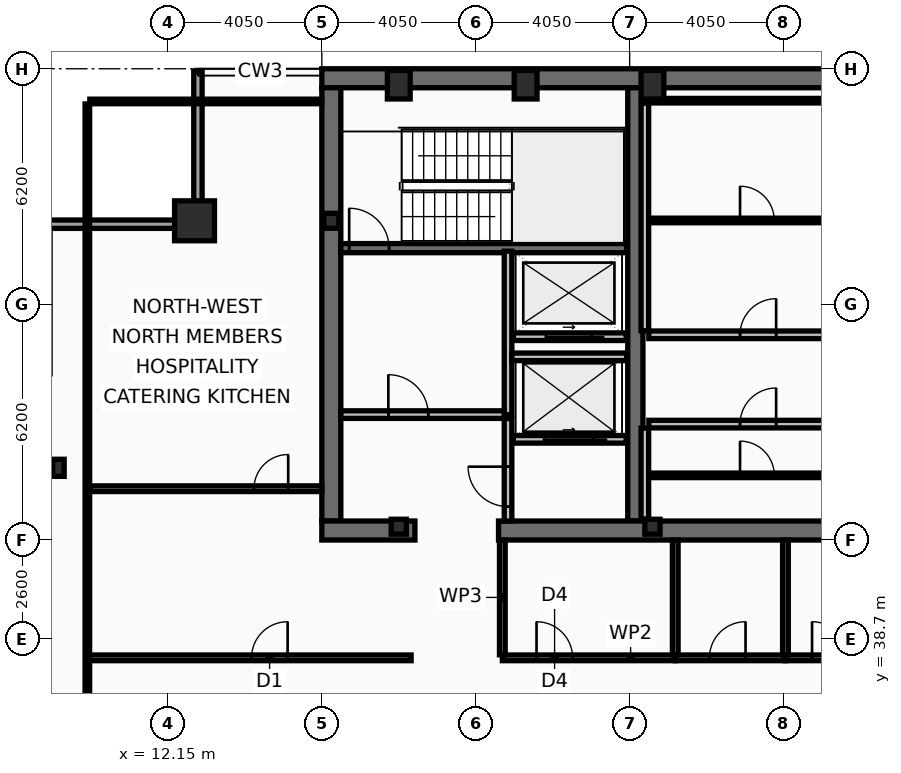
"""IFC4 building model, lengths in metres.
Left out: names, types, materials, properties, quantities, classifications, styles, units other than length and angle.
Written with IfcOpenShell. Run it as: python <this file> out.ifc"""

import sys

from ifc_helpers import new_model, si_unit, direction, frame, frame_2d, origin, origin_2d, place, context, subcontext, project, spatial, rectangle, hollow_rectangle, i_section, extrude, element, fill, save


model = new_model("IFC4")
c1 = context("Model", 3, precision=1e-05, world=origin(), true_north=direction((0.0, 1.0)))
c2 = subcontext(c1, "Body", "Model", "MODEL_VIEW")
j1 = project(units=[si_unit("LENGTHUNIT", "METRE"), si_unit("PLANEANGLEUNIT", "RADIAN")], contexts=[c1])
p1 = place(None, origin())
s1 = spatial("IfcSite", under=j1, at=p1, CompositionType="ELEMENT")
p2 = place(p1, origin())
s2 = spatial("IfcBuilding", under=s1, at=p2, CompositionType="ELEMENT")
p3 = place(p2, frame((0.0, 0.0, 280.6)))
s3 = spatial("IfcBuildingStorey", under=s2, at=p3, CompositionType="ELEMENT", Elevation=280.6)
p4 = place(p3, frame((16.2, 53.45, 0.0), z_axis=(0.0, 0.0, 1.0), x_axis=(1.0, 0.0, 0.0)))
e1 = element("IfcWall", 1, at=p4, inside=s3, PredefinedType="SHEAR", context=c2, shape_type="SweptSolid", body=[
    extrude(rectangle(XDim=40.5, YDim=0.5, at=frame_2d((20.25, 0.0))), origin(), (0.0, 0.0, 1.0), 3.44),
])
p5 = place(p3, frame((16.45, 41.8, 0.0), z_axis=(0.0, 0.0, 1.0), x_axis=(0.0, 1.0, 0.0)))
e2 = element("IfcWall", 2, at=p5, inside=s3, PredefinedType="SHEAR", context=c2, shape_type="SweptSolid", body=[
    extrude(rectangle(XDim=11.4, YDim=0.5, at=frame_2d((5.7, 0.0))), origin(), (0.0, 0.0, 1.0), 3.44),
])
p6 = place(p3, frame((24.45, 41.8, 0.0), z_axis=(0.0, 0.0, 1.0), x_axis=(0.0, 1.0, 0.0)))
e3 = element("IfcWall", 3, at=p6, inside=s3, PredefinedType="SHEAR", context=c2, shape_type="SweptSolid", body=[
    extrude(rectangle(XDim=11.4, YDim=0.4, at=frame_2d((5.7, 0.0))), origin(), (0.0, 0.0, 1.0), 3.44),
])
p7 = place(p3, frame((18.65, 41.55, 0.0), z_axis=(0.0, 0.0, 1.0), x_axis=(-1.0, 0.0, 0.0)))
e4 = element("IfcWall", 4, at=p7, inside=s3, PredefinedType="SHEAR", context=c2, shape_type="SweptSolid", body=[
    extrude(rectangle(XDim=2.45, YDim=0.5, at=frame_2d((1.225, 0.0))), origin(), (0.0, 0.0, 1.0), 3.44),
])
p8 = place(p3, frame((32.3, 41.55, 0.0), z_axis=(0.0, 0.0, 1.0), x_axis=(-1.0, 0.0, 0.0)))
e5 = element("IfcWall", 5, at=p8, inside=s3, PredefinedType="SHEAR", context=c2, shape_type="SweptSolid", body=[
    extrude(rectangle(XDim=11.45, YDim=0.5, at=frame_2d((5.725, 0.0))), origin(), (0.0, 0.0, 1.0), 3.44),
])
p9 = place(p3, frame((16.7, 48.98, 0.0), z_axis=(0.0, 0.0, 1.0), x_axis=(1.0, 0.0, 0.0)))
e6 = element("IfcWall", 6, at=p9, inside=s3, PredefinedType="SHEAR", context=c2, shape_type="SweptSolid", body=[
    extrude(rectangle(XDim=7.52, YDim=0.24, at=frame_2d((3.76, 0.0))), origin(), (0.0, 0.0, 1.0), 3.44),
])
p10 = place(p9, frame((0.22, 0.0, 0.0)))
e7 = element("IfcOpeningElement", 7, at=p10, cuts=e6, PredefinedType="OPENING", context=c2, shape_type="SweptSolid", body=[
    extrude(rectangle(XDim=1.05, YDim=2.15, at=frame_2d((0.525, 1.075))), frame((0.0, 0.13, 0.0), z_axis=(0.0, -1.0, 0.0), x_axis=(1.0, 0.0, 0.0)), (0.0, 0.0, 1.0), 0.26),
])
p11 = place(p3, frame((12.85, 49.7, 0.0), z_axis=(0.0, 0.0, 1.0), x_axis=(1.0, 0.0, 0.0)))
e8 = element("IfcColumn", 8, at=p11, inside=s3, PredefinedType="COLUMN", context=c2, shape_type="SweptSolid", body=[
    extrude(hollow_rectangle(XDim=1.05, YDim=1.05, WallThickness=0.055, at=origin_2d()), origin(), (0.0, 0.0, 1.0), 3.6),
])
for number, where, z_axis, x_axis in (
    (9, (18.225, 53.28, 0.0), (0.0, 0.0, 1.0), (1.0, 0.0, 0.0)),
    (10, (21.562, 53.28, 0.0), (0.0, 0.0, 1.0), (1.0, 0.0, 0.0)),
    (11, (24.9, 53.28, 0.0), (0.0, 0.0, 1.0), (1.0, 0.0, 0.0)),
):
    element("IfcColumn", number, at=place(p3, frame(where, z_axis=z_axis, x_axis=x_axis)), inside=s3, PredefinedType="COLUMN", context=c2, shape_type="SweptSolid", body=[
        extrude(hollow_rectangle(XDim=0.6, YDim=0.75, WallThickness=0.045, at=origin_2d()), origin(), (0.0, 0.0, 1.0), 3.6),
    ])
p12 = place(p3, frame((9.27, 43.2, 0.0), z_axis=(0.0, 0.0, 1.0), x_axis=(1.0, 0.0, 0.0)))
e12 = element("IfcColumn", 12, at=p12, inside=s3, PredefinedType="COLUMN", context=c2, shape_type="SweptSolid", body=[
    extrude(i_section(OverallWidth=0.3, OverallDepth=0.45, WebThickness=0.014, FlangeThickness=0.026, at=origin_2d()), origin(), (0.0, 0.0, 1.0), 3.6),
])
for number, where, z_axis, x_axis in (
    (13, (16.45, 49.7, 0.0), (0.0, 0.0, 1.0), (1.0, 0.0, 0.0)),
    (14, (18.225, 41.65, 0.0), (0.0, 0.0, 1.0), (1.0, 0.0, 0.0)),
    (15, (24.9, 41.65, 0.0), (0.0, 0.0, 1.0), (1.0, 0.0, 0.0)),
):
    element("IfcColumn", number, at=place(p3, frame(where, z_axis=z_axis, x_axis=x_axis)), inside=s3, PredefinedType="COLUMN", context=c2, shape_type="SweptSolid", body=[
        extrude(i_section(OverallWidth=0.399, OverallDepth=0.393, WebThickness=0.023, FlangeThickness=0.037, at=origin_2d()), origin(), (0.0, 0.0, 1.0), 3.6),
    ])
p13 = place(p3, frame((8.83, 49.61, 0.0), z_axis=(0.0, 0.0, 1.0), x_axis=(1.0, 0.0, 0.0)))
e16 = element("IfcWall", 16, at=p13, inside=s3, PredefinedType="SOLIDWALL", context=c2, shape_type="SweptSolid", body=[
    extrude(rectangle(XDim=4.22, YDim=0.22, at=frame_2d((2.11, 0.0))), origin(), (0.0, 0.0, 1.0), 2.88),
])
p14 = place(p3, frame((12.94, 49.72, 0.0), z_axis=(0.0, 0.0, 1.0), x_axis=(0.0, 1.0, 0.0)))
e17 = element("IfcWall", 17, at=p14, inside=s3, PredefinedType="SOLIDWALL", context=c2, shape_type="SweptSolid", body=[
    extrude(rectangle(XDim=3.91, YDim=0.22, at=frame_2d((1.955, 0.0))), origin(), (0.0, 0.0, 1.0), 2.88),
])
p15 = place(p3, frame((24.21, 43.95, 0.0), z_axis=(0.0, 0.0, 1.0), x_axis=(-1.0, 0.0, 0.0)))
e18 = element("IfcWall", 18, at=p15, inside=s3, PredefinedType="PARTITIONING", context=c2, shape_type="SweptSolid", body=[
    extrude(rectangle(XDim=2.97, YDim=0.2, at=frame_2d((1.485, 0.0))), origin(), (0.0, 0.0, 1.0), 3.44),
])
p16 = place(p15, frame((0.86, 0.0, 0.0)))
e19 = element("IfcOpeningElement", 19, at=p16, cuts=e18, PredefinedType="OPENING", context=c2, shape_type="SweptSolid", body=[
    extrude(rectangle(XDim=1.3, YDim=2.18, at=frame_2d((0.65, 1.09))), frame((0.0, 0.11, 0.0), z_axis=(0.0, -1.0, 0.0), x_axis=(1.0, 0.0, 0.0)), (0.0, 0.0, 1.0), 0.22),
])
p17 = place(p3, frame((24.21, 46.65, 0.0), z_axis=(0.0, 0.0, 1.0), x_axis=(-1.0, 0.0, 0.0)))
e20 = element("IfcWall", 20, at=p17, inside=s3, PredefinedType="PARTITIONING", context=c2, shape_type="SweptSolid", body=[
    extrude(rectangle(XDim=2.97, YDim=0.2, at=frame_2d((1.485, 0.0))), origin(), (0.0, 0.0, 1.0), 3.44),
])
p18 = place(p17, frame((0.91, 0.0, 0.0)))
e21 = element("IfcOpeningElement", 21, at=p18, cuts=e20, PredefinedType="OPENING", context=c2, shape_type="SweptSolid", body=[
    extrude(rectangle(XDim=1.2, YDim=2.18, at=frame_2d((0.6, 1.09))), frame((0.0, 0.11, 0.0), z_axis=(0.0, -1.0, 0.0), x_axis=(1.0, 0.0, 0.0)), (0.0, 0.0, 1.0), 0.22),
])
p19 = place(p3, frame((21.1, 44.6, 0.0), z_axis=(0.0, 0.0, 1.0), x_axis=(0.0, 1.0, 0.0)))
e22 = element("IfcWall", 22, at=p19, inside=s3, PredefinedType="PARTITIONING", context=c2, shape_type="SweptSolid", body=[
    extrude(rectangle(XDim=4.3, YDim=0.2, at=frame_2d((2.15, 0.0))), origin(), (0.0, 0.0, 1.0), 3.44),
])
p20 = place(p3, frame((16.7, 44.6, 0.0), z_axis=(0.0, 0.0, 1.0), x_axis=(1.0, 0.0, 0.0)))
e23 = element("IfcWall", 23, at=p20, inside=s3, PredefinedType="PARTITIONING", context=c2, shape_type="SweptSolid", body=[
    extrude(rectangle(XDim=4.3, YDim=0.2, at=frame_2d((2.15, 0.0))), origin(), (0.0, 0.0, 1.0), 3.44),
])
p21 = place(p20, frame((1.25, 0.0, 0.0)))
e24 = element("IfcOpeningElement", 24, at=p21, cuts=e23, PredefinedType="OPENING", context=c2, shape_type="SweptSolid", body=[
    extrude(rectangle(XDim=1.05, YDim=2.15, at=frame_2d((0.525, 1.075))), frame((0.0, 0.11, 0.0), z_axis=(0.0, -1.0, 0.0), x_axis=(1.0, 0.0, 0.0)), (0.0, 0.0, 1.0), 0.22),
])
p22 = place(p3, frame((21.2, 46.12, 0.0), z_axis=(0.0, 0.0, 1.0), x_axis=(1.0, 0.0, 0.0)))
e25 = element("IfcWall", 25, at=p22, inside=s3, PredefinedType="PARTITIONING", context=c2, shape_type="SweptSolid", body=[
    extrude(rectangle(XDim=3.02, YDim=0.2, at=frame_2d((1.51, 0.0))), origin(), (0.0, 0.0, 1.0), 3.44),
])
p23 = place(p3, frame((21.1, 41.8, 0.0), z_axis=(0.0, 0.0, 1.0), x_axis=(0.0, 1.0, 0.0)))
e26 = element("IfcWall", 26, at=p23, inside=s3, PredefinedType="PARTITIONING", context=c2, shape_type="SweptSolid", body=[
    extrude(rectangle(XDim=2.695, YDim=0.2, at=frame_2d((1.348, 0.0))), origin(), (0.0, 0.0, 1.0), 3.44),
])
p24 = place(p23, frame((0.38, 0.0, 0.0)))
e27 = element("IfcOpeningElement", 27, at=p24, cuts=e26, PredefinedType="OPENING", context=c2, shape_type="SweptSolid", body=[
    extrude(rectangle(XDim=1.05, YDim=2.15, at=frame_2d((0.525, 1.075))), frame((0.0, 0.11, 0.0), z_axis=(0.0, -1.0, 0.0), x_axis=(1.0, 0.0, 0.0)), (0.0, 0.0, 1.0), 0.22),
])
p25 = place(p3, frame((24.7, 46.805, 0.0), z_axis=(0.0, 0.0, 1.0), x_axis=(0.0, 1.0, 0.0)))
e28 = element("IfcWall", 28, at=p25, inside=s3, PredefinedType="PARTITIONING", context=c2, shape_type="SweptSolid", body=[
    extrude(rectangle(XDim=5.99, YDim=0.2, at=frame_2d((2.995, 0.0))), origin(), (0.0, 0.0, 1.0), 3.44),
])
p26 = place(p3, frame((24.805, 52.86, 0.0), z_axis=(0.0, 0.0, 1.0), x_axis=(1.0, 0.0, 0.0)))
e29 = element("IfcWall", 29, at=p26, inside=s3, PredefinedType="PARTITIONING", context=c2, shape_type="SweptSolid", body=[
    extrude(rectangle(XDim=7.51, YDim=0.12, at=frame_2d((3.755, 0.0))), origin(), (0.0, 0.0, 1.0), 3.44),
])
p27 = place(p3, frame((24.805, 49.709, 0.0), z_axis=(0.0, 0.0, 1.0), x_axis=(1.0, 0.0, 0.0)))
e30 = element("IfcWall", 30, at=p27, inside=s3, PredefinedType="PARTITIONING", context=c2, shape_type="SweptSolid", body=[
    extrude(rectangle(XDim=7.51, YDim=0.12, at=frame_2d((3.755, 0.0))), origin(), (0.0, 0.0, 1.0), 3.44),
])
p28 = place(p27, frame((2.4, 0.0, 0.0)))
e31 = element("IfcOpeningElement", 31, at=p28, cuts=e30, PredefinedType="OPENING", context=c2, shape_type="SweptSolid", body=[
    extrude(rectangle(XDim=0.9, YDim=2.05, at=frame_2d((0.45, 1.025))), frame((0.0, 0.07, 0.0), z_axis=(0.0, -1.0, 0.0), x_axis=(1.0, 0.0, 0.0)), (0.0, 0.0, 1.0), 0.14),
])
p29 = place(p3, frame((24.805, 46.7, 0.0), z_axis=(0.0, 0.0, 1.0), x_axis=(1.0, 0.0, 0.0)))
e32 = element("IfcWall", 32, at=p29, inside=s3, PredefinedType="PARTITIONING", context=c2, shape_type="SweptSolid", body=[
    extrude(rectangle(XDim=7.51, YDim=0.2, at=frame_2d((3.755, 0.0))), origin(), (0.0, 0.0, 1.0), 3.44),
])
p30 = place(p29, frame((2.4, 0.0, 0.0)))
e33 = element("IfcOpeningElement", 33, at=p30, cuts=e32, PredefinedType="OPENING", context=c2, shape_type="SweptSolid", body=[
    extrude(rectangle(XDim=0.95, YDim=2.1, at=frame_2d((0.475, 1.05))), frame((0.0, 0.11, 0.0), z_axis=(0.0, -1.0, 0.0), x_axis=(1.0, 0.0, 0.0)), (0.0, 0.0, 1.0), 0.22),
])
p31 = place(p3, frame((24.7, 41.85, 0.0), z_axis=(0.0, 0.0, 1.0), x_axis=(0.0, 1.0, 0.0)))
e34 = element("IfcWall", 34, at=p31, inside=s3, PredefinedType="PARTITIONING", context=c2, shape_type="SweptSolid", body=[
    extrude(rectangle(XDim=2.395, YDim=0.2, at=frame_2d((1.198, 0.0))), origin(), (0.0, 0.0, 1.0), 3.44),
])
p32 = place(p3, frame((24.805, 43.002, 0.0), z_axis=(0.0, 0.0, 1.0), x_axis=(1.0, 0.0, 0.0)))
e35 = element("IfcWall", 35, at=p32, inside=s3, PredefinedType="PARTITIONING", context=c2, shape_type="SweptSolid", body=[
    extrude(rectangle(XDim=7.34, YDim=0.12, at=frame_2d((3.67, 0.0))), origin(), (0.0, 0.0, 1.0), 3.44),
])
p33 = place(p32, frame((2.4, 0.0, 0.0)))
e36 = element("IfcOpeningElement", 36, at=p33, cuts=e35, PredefinedType="OPENING", context=c2, shape_type="SweptSolid", body=[
    extrude(rectangle(XDim=0.9, YDim=2.05, at=frame_2d((0.45, 1.025))), frame((0.0, 0.07, 0.0), z_axis=(0.0, -1.0, 0.0), x_axis=(1.0, 0.0, 0.0)), (0.0, 0.0, 1.0), 0.14),
])
p34 = place(p3, frame((24.805, 44.35, 0.0), z_axis=(0.0, 0.0, 1.0), x_axis=(1.0, 0.0, 0.0)))
e37 = element("IfcWall", 37, at=p34, inside=s3, PredefinedType="PARTITIONING", context=c2, shape_type="SweptSolid", body=[
    extrude(rectangle(XDim=7.34, YDim=0.2, at=frame_2d((3.67, 0.0))), origin(), (0.0, 0.0, 1.0), 3.44),
])
p35 = place(p34, frame((2.4, 0.0, 0.0)))
e38 = element("IfcOpeningElement", 38, at=p35, cuts=e37, PredefinedType="OPENING", context=c2, shape_type="SweptSolid", body=[
    extrude(rectangle(XDim=0.95, YDim=2.1, at=frame_2d((0.475, 1.05))), frame((0.0, 0.11, 0.0), z_axis=(0.0, -1.0, 0.0), x_axis=(1.0, 0.0, 0.0)), (0.0, 0.0, 1.0), 0.22),
])
p36 = place(p3, frame((20.95, 38.2, 0.0), z_axis=(0.0, 0.0, 1.0), x_axis=(1.0, 0.0, 0.0)))
e39 = element("IfcWall", 39, at=p36, inside=s3, PredefinedType="PARTITIONING", context=c2, shape_type="SweptSolid", body=[
    extrude(rectangle(XDim=4.55, YDim=0.15, at=frame_2d((2.275, 0.0))), origin(), (0.0, 0.0, 1.0), 2.78),
])
p37 = place(p36, frame((0.9, 0.0, 0.0)))
e40 = element("IfcOpeningElement", 40, at=p37, cuts=e39, PredefinedType="OPENING", context=c2, shape_type="SweptSolid", body=[
    extrude(rectangle(XDim=0.95, YDim=2.05, at=frame_2d((0.475, 1.025))), frame((0.0, 0.085, 0.0), z_axis=(0.0, -1.0, 0.0), x_axis=(1.0, 0.0, 0.0)), (0.0, 0.0, 1.0), 0.17),
])
p38 = place(p3, frame((25.5, 38.2, 0.0), z_axis=(0.0, 0.0, 1.0), x_axis=(1.0, 0.0, 0.0)))
e41 = element("IfcWall", 41, at=p38, inside=s3, PredefinedType="PARTITIONING", context=c2, shape_type="SweptSolid", body=[
    extrude(rectangle(XDim=2.9, YDim=0.15, at=frame_2d((1.45, 0.0))), origin(), (0.0, 0.0, 1.0), 3.44),
])
p39 = place(p38, frame((0.9, 0.0, 0.0)))
e42 = element("IfcOpeningElement", 42, at=p39, cuts=e41, PredefinedType="OPENING", context=c2, shape_type="SweptSolid", body=[
    extrude(rectangle(XDim=0.95, YDim=2.05, at=frame_2d((0.475, 1.025))), frame((0.0, 0.085, 0.0), z_axis=(0.0, -1.0, 0.0), x_axis=(1.0, 0.0, 0.0)), (0.0, 0.0, 1.0), 0.17),
])
p40 = place(p3, frame((28.4, 38.2, 0.0), z_axis=(0.0, 0.0, 1.0), x_axis=(1.0, 0.0, 0.0)))
e43 = element("IfcWall", 43, at=p40, inside=s3, PredefinedType="PARTITIONING", context=c2, shape_type="SweptSolid", body=[
    extrude(rectangle(XDim=3.78, YDim=0.15, at=frame_2d((1.89, 0.0))), origin(), (0.0, 0.0, 1.0), 2.78),
])
p41 = place(p40, frame((0.7, 0.0, 0.0)))
e44 = element("IfcOpeningElement", 44, at=p41, cuts=e43, PredefinedType="OPENING", context=c2, shape_type="SweptSolid", body=[
    extrude(rectangle(XDim=0.95, YDim=2.05, at=frame_2d((0.475, 1.025))), frame((0.0, 0.085, 0.0), z_axis=(0.0, -1.0, 0.0), x_axis=(1.0, 0.0, 0.0)), (0.0, 0.0, 1.0), 0.17),
])
for number, where, z_axis, x_axis in (
    (45, (20.95, 38.28, 0.0), (0.0, 0.0, 1.0), (0.0, 1.0, 0.0)),
    (46, (25.5, 38.28, 0.0), (0.0, 0.0, 1.0), (0.0, 1.0, 0.0)),
    (47, (28.4, 38.28, 0.0), (0.0, 0.0, 1.0), (0.0, 1.0, 0.0)),
):
    element("IfcWall", number, at=place(p3, frame(where, z_axis=z_axis, x_axis=x_axis)), inside=s3, PredefinedType="PARTITIONING", context=c2, shape_type="SweptSolid", body=[
        extrude(rectangle(XDim=3.02, YDim=0.15, at=frame_2d((1.51, 0.0))), origin(), (0.0, 0.0, 1.0), 3.44),
    ])
p42 = place(p3, frame((10.03, 38.2, 0.0), z_axis=(0.0, 0.0, 1.0), x_axis=(1.0, 0.0, 0.0)))
e48 = element("IfcWall", 48, at=p42, inside=s3, PredefinedType="PARTITIONING", context=c2, shape_type="SweptSolid", body=[
    extrude(rectangle(XDim=8.52, YDim=0.15, at=frame_2d((4.26, 0.0))), origin(), (0.0, 0.0, 1.0), 2.78),
])
p43 = place(p42, frame((4.32, 0.0, 0.0)))
e49 = element("IfcOpeningElement", 49, at=p43, cuts=e48, PredefinedType="OPENING", context=c2, shape_type="SweptSolid", body=[
    extrude(rectangle(XDim=0.95, YDim=2.05, at=frame_2d((0.475, 1.025))), frame((0.0, 0.085, 0.0), z_axis=(0.0, -1.0, 0.0), x_axis=(1.0, 0.0, 0.0)), (0.0, 0.0, 1.0), 0.17),
])
p44 = place(p3, frame((10.095, 42.65, 0.0), z_axis=(0.0, 0.0, 1.0), x_axis=(1.0, 0.0, 0.0)))
e50 = element("IfcWall", 50, at=p44, inside=s3, PredefinedType="PARTITIONING", context=c2, shape_type="SweptSolid", body=[
    extrude(rectangle(XDim=6.105, YDim=0.15, at=frame_2d((3.052, 0.0))), origin(), (0.0, 0.0, 1.0), 2.78),
])
p45 = place(p44, frame((4.32, 0.0, 0.0)))
e51 = element("IfcOpeningElement", 51, at=p45, cuts=e50, PredefinedType="OPENING", context=c2, shape_type="SweptSolid", body=[
    extrude(rectangle(XDim=0.9, YDim=2.05, at=frame_2d((0.45, 1.025))), frame((0.0, 0.085, 0.0), z_axis=(0.0, -1.0, 0.0), x_axis=(1.0, 0.0, 0.0)), (0.0, 0.0, 1.0), 0.17),
])
p46 = place(p3, frame((10.03, 10.665, 0.0), z_axis=(0.0, 0.0, 1.0), x_axis=(0.0, 1.0, 0.0)))
e52 = element("IfcWall", 52, at=p46, inside=s3, PredefinedType="PARTITIONING", context=c2, shape_type="SweptSolid", body=[
    extrude(rectangle(XDim=42.11, YDim=0.12, at=frame_2d((21.055, 0.0))), origin(), (0.0, 0.0, 1.0), 2.78),
])
p47 = place(p3, frame((10.095, 52.84, 0.0), z_axis=(0.0, 0.0, 1.0), x_axis=(1.0, 0.0, 0.0)))
e53 = element("IfcWall", 53, at=p47, inside=s3, PredefinedType="PARTITIONING", context=c2, shape_type="SweptSolid", body=[
    extrude(rectangle(XDim=6.105, YDim=0.12, at=frame_2d((3.052, 0.0))), origin(), (0.0, 0.0, 1.0), 3.44),
])
p48 = place(p10, origin())
e54 = element("IfcDoor", 54, at=p48, inside=s3, OperationType="SINGLE_SWING_LEFT", PredefinedType="DOOR", context=c2, shape_type="SweptSolid", body=[
    extrude(rectangle(XDim=1.05, YDim=2.15, at=frame_2d((0.525, 1.075))), frame((0.0, 0.025, 0.0), z_axis=(0.0, -1.0, 0.0), x_axis=(1.0, 0.0, 0.0)), (0.0, 0.0, 1.0), 0.05),
])
fill(e7, e54)
p49 = place(p16, origin())
e55 = element("IfcDoor", 55, at=p49, inside=s3, OperationType="SLIDING_TO_LEFT", PredefinedType="DOOR", context=c2, shape_type="SweptSolid", body=[
    extrude(rectangle(XDim=1.3, YDim=2.18, at=frame_2d((0.65, 1.09))), frame((0.0, 0.025, 0.0), z_axis=(0.0, -1.0, 0.0), x_axis=(1.0, 0.0, 0.0)), (0.0, 0.0, 1.0), 0.05),
])
fill(e19, e55)
p50 = place(p18, origin())
e56 = element("IfcDoor", 56, at=p50, inside=s3, OperationType="SLIDING_TO_LEFT", PredefinedType="DOOR", context=c2, shape_type="SweptSolid", body=[
    extrude(rectangle(XDim=1.2, YDim=2.18, at=frame_2d((0.6, 1.09))), frame((0.0, 0.025, 0.0), z_axis=(0.0, -1.0, 0.0), x_axis=(1.0, 0.0, 0.0)), (0.0, 0.0, 1.0), 0.05),
])
fill(e21, e56)
p51 = place(p21, origin())
e57 = element("IfcDoor", 57, at=p51, inside=s3, OperationType="SINGLE_SWING_LEFT", PredefinedType="DOOR", context=c2, shape_type="SweptSolid", body=[
    extrude(rectangle(XDim=1.05, YDim=2.15, at=frame_2d((0.525, 1.075))), frame((0.0, 0.025, 0.0), z_axis=(0.0, -1.0, 0.0), x_axis=(1.0, 0.0, 0.0)), (0.0, 0.0, 1.0), 0.05),
])
fill(e24, e57)
p52 = place(p24, origin())
e58 = element("IfcDoor", 58, at=p52, inside=s3, OperationType="SINGLE_SWING_RIGHT", PredefinedType="DOOR", context=c2, shape_type="SweptSolid", body=[
    extrude(rectangle(XDim=1.05, YDim=2.15, at=frame_2d((0.525, 1.075))), frame((0.0, 0.025, 0.0), z_axis=(0.0, -1.0, 0.0), x_axis=(1.0, 0.0, 0.0)), (0.0, 0.0, 1.0), 0.05),
])
fill(e27, e58)
p53 = place(p28, origin())
e59 = element("IfcDoor", 59, at=p53, inside=s3, OperationType="SINGLE_SWING_LEFT", PredefinedType="DOOR", context=c2, shape_type="SweptSolid", body=[
    extrude(rectangle(XDim=0.9, YDim=2.05, at=frame_2d((0.45, 1.025))), frame((0.0, 0.025, 0.0), z_axis=(0.0, -1.0, 0.0), x_axis=(1.0, 0.0, 0.0)), (0.0, 0.0, 1.0), 0.05),
])
fill(e31, e59)
p54 = place(p30, origin())
e60 = element("IfcDoor", 60, at=p54, inside=s3, OperationType="SINGLE_SWING_RIGHT", PredefinedType="DOOR", context=c2, shape_type="SweptSolid", body=[
    extrude(rectangle(XDim=0.95, YDim=2.1, at=frame_2d((0.475, 1.05))), frame((0.0, 0.025, 0.0), z_axis=(0.0, -1.0, 0.0), x_axis=(1.0, 0.0, 0.0)), (0.0, 0.0, 1.0), 0.05),
])
fill(e33, e60)
p55 = place(p33, origin())
e61 = element("IfcDoor", 61, at=p55, inside=s3, OperationType="SINGLE_SWING_LEFT", PredefinedType="DOOR", context=c2, shape_type="SweptSolid", body=[
    extrude(rectangle(XDim=0.9, YDim=2.05, at=frame_2d((0.45, 1.025))), frame((0.0, 0.025, 0.0), z_axis=(0.0, -1.0, 0.0), x_axis=(1.0, 0.0, 0.0)), (0.0, 0.0, 1.0), 0.05),
])
fill(e36, e61)
p56 = place(p35, origin())
e62 = element("IfcDoor", 62, at=p56, inside=s3, OperationType="SINGLE_SWING_RIGHT", PredefinedType="DOOR", context=c2, shape_type="SweptSolid", body=[
    extrude(rectangle(XDim=0.95, YDim=2.1, at=frame_2d((0.475, 1.05))), frame((0.0, 0.025, 0.0), z_axis=(0.0, -1.0, 0.0), x_axis=(1.0, 0.0, 0.0)), (0.0, 0.0, 1.0), 0.05),
])
fill(e38, e62)
p57 = place(p37, origin())
e63 = element("IfcDoor", 63, at=p57, inside=s3, OperationType="SINGLE_SWING_LEFT", PredefinedType="DOOR", context=c2, shape_type="SweptSolid", body=[
    extrude(rectangle(XDim=0.95, YDim=2.05, at=frame_2d((0.475, 1.025))), frame((0.0, 0.025, 0.0), z_axis=(0.0, -1.0, 0.0), x_axis=(1.0, 0.0, 0.0)), (0.0, 0.0, 1.0), 0.05),
])
fill(e40, e63)
p58 = place(p39, origin())
e64 = element("IfcDoor", 64, at=p58, inside=s3, OperationType="SINGLE_SWING_RIGHT", PredefinedType="DOOR", context=c2, shape_type="SweptSolid", body=[
    extrude(rectangle(XDim=0.95, YDim=2.05, at=frame_2d((0.475, 1.025))), frame((0.0, 0.025, 0.0), z_axis=(0.0, -1.0, 0.0), x_axis=(1.0, 0.0, 0.0)), (0.0, 0.0, 1.0), 0.05),
])
fill(e42, e64)
p59 = place(p41, origin())
e65 = element("IfcDoor", 65, at=p59, inside=s3, OperationType="SINGLE_SWING_LEFT", PredefinedType="DOOR", context=c2, shape_type="SweptSolid", body=[
    extrude(rectangle(XDim=0.95, YDim=2.05, at=frame_2d((0.475, 1.025))), frame((0.0, 0.025, 0.0), z_axis=(0.0, -1.0, 0.0), x_axis=(1.0, 0.0, 0.0)), (0.0, 0.0, 1.0), 0.05),
])
fill(e44, e65)
p60 = place(p43, origin())
e66 = element("IfcDoor", 66, at=p60, inside=s3, OperationType="SINGLE_SWING_RIGHT", PredefinedType="DOOR", context=c2, shape_type="SweptSolid", body=[
    extrude(rectangle(XDim=0.95, YDim=2.05, at=frame_2d((0.475, 1.025))), frame((0.0, 0.025, 0.0), z_axis=(0.0, -1.0, 0.0), x_axis=(1.0, 0.0, 0.0)), (0.0, 0.0, 1.0), 0.05),
])
fill(e49, e66)
p61 = place(p45, origin())
e67 = element("IfcDoor", 67, at=p61, inside=s3, OperationType="SINGLE_SWING_RIGHT", PredefinedType="DOOR", context=c2, shape_type="SweptSolid", body=[
    extrude(rectangle(XDim=0.9, YDim=2.05, at=frame_2d((0.45, 1.025))), frame((0.0, 0.025, 0.0), z_axis=(0.0, -1.0, 0.0), x_axis=(1.0, 0.0, 0.0)), (0.0, 0.0, 1.0), 0.05),
])
fill(e51, e67)
save(model, sys.argv[1])
